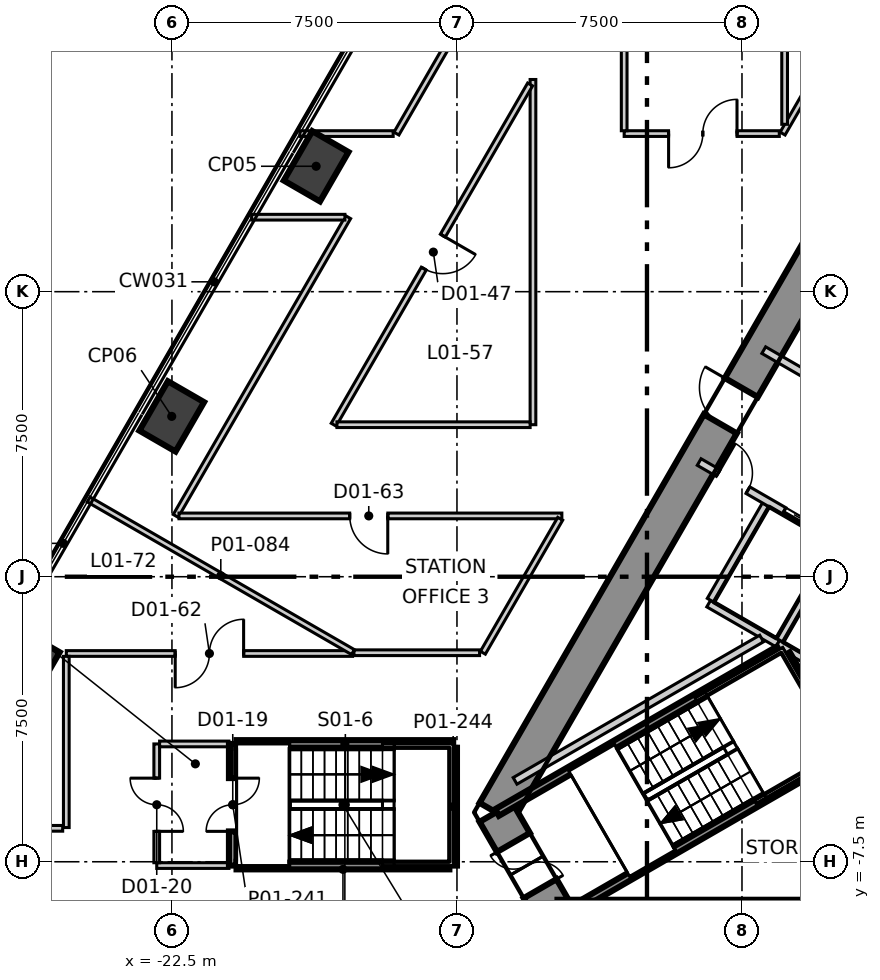
"""IFC4 building model, lengths in metres.
Left out: names, types, materials, properties, quantities, classifications, styles, units other than length and angle.
Written with IfcOpenShell. Run it as: python <this file> out.ifc"""

import sys

from ifc_helpers import new_model, si_unit, direction, frame, frame_2d, origin, origin_2d, place, context, subcontext, project, spatial, polyline, rectangle, outline, extrude, element, fill, save


model = new_model("IFC4")
c1 = context("Model", 3, precision=1e-05, world=origin(), true_north=direction((0.0, 1.0)))
c2 = subcontext(c1, "Body", "Model", "MODEL_VIEW")
j1 = project(units=[si_unit("LENGTHUNIT", "METRE"), si_unit("PLANEANGLEUNIT", "RADIAN")], contexts=[c1])
p1 = place(None, origin())
s1 = spatial("IfcSite", under=j1, at=p1, CompositionType="ELEMENT")
p2 = place(p1, origin())
s2 = spatial("IfcBuilding", under=s1, at=p2, CompositionType="ELEMENT")
p3 = place(p2, frame((0.0, 0.0, 8.5)))
s3 = spatial("IfcBuildingStorey", under=s2, at=p3, CompositionType="ELEMENT", Elevation=8.5)
p4 = place(p3, frame((-1.617, 15.2, -0.4), z_axis=(0.0, 0.0, 1.0), x_axis=(-0.499992141631, -0.866029940768, 0.0)))
e1 = element("IfcWall", 1, at=p4, inside=s3, PredefinedType="SHEAR", context=c2, shape_type="SweptSolid", body=[
    extrude(outline(polyline([(-0.289, -0.499), (1.656, -0.499), (3.601, -0.499), (5.547, -0.499), (7.492, -0.499), (9.437, -0.5), (11.382, -0.5), (13.328, -0.5), (15.273, -0.5), (17.218, -0.5), (19.163, -0.5), (21.109, -0.5), (23.054, -0.5), (24.999, -0.5), (24.422, 0.5), (22.566, 0.5), (20.709, 0.5), (18.853, 0.5), (16.997, 0.5), (15.14, 0.5), (13.284, 0.5), (11.427, 0.5), (9.571, 0.5), (7.715, 0.5), (5.858, 0.5), (4.002, 0.5), (2.146, 0.5), (0.289, 0.5), (-0.289, -0.499)])), origin(), (0.0, 0.0, 1.0), 6.0),
])
p5 = place(p4, frame((11.805, 0.0, 0.4)))
e2 = element("IfcOpeningElement", 2, at=p5, cuts=e1, PredefinedType="OPENING", context=c2, shape_type="SweptSolid", body=[
    extrude(rectangle(XDim=1.1, YDim=2.1, at=frame_2d((0.55, 1.05))), frame((0.0, 0.51, 0.0), z_axis=(0.0, -1.0, 0.0), x_axis=(1.0, 0.0, 0.0)), (0.0, 0.0, 1.0), 1.02),
])
p6 = place(p3, frame((-13.972, -6.2, -0.4), z_axis=(0.0, 0.0, 1.0), x_axis=(0.500077567175, -0.865980615723, 0.0)))
e3 = element("IfcWall", 3, at=p6, inside=s3, PredefinedType="SHEAR", context=c2, shape_type="SweptSolid", body=[
    extrude(outline(polyline([(-0.289, -0.5), (1.616, -0.5), (3.522, -0.5), (2.944, 0.499), (1.617, 0.5), (0.289, 0.5), (-0.289, -0.5)])), origin(), (0.0, 0.0, 1.0), 6.0),
])
p7 = place(p6, frame((0.917, 0.0, 0.4)))
e4 = element("IfcOpeningElement", 4, at=p7, cuts=e3, PredefinedType="OPENING", context=c2, shape_type="SweptSolid", body=[
    extrude(rectangle(XDim=1.4, YDim=2.1, at=frame_2d((0.7, 1.05))), frame((0.0, 0.51, 0.0), z_axis=(0.0, -1.0, 0.0), x_axis=(1.0, 0.0, 0.0)), (0.0, 0.0, 1.0), 1.02),
])
p8 = place(p3, frame((-12.355, -9.0, -0.4), z_axis=(0.0, 0.0, 1.0), x_axis=(1.0, 0.0, 0.0)))
e5 = element("IfcWall", 5, at=p8, inside=s3, PredefinedType="SHEAR", context=c2, shape_type="SweptSolid", body=[
    extrude(outline(polyline([(-0.289, -0.5), (1.656, -0.5), (3.601, -0.5), (5.547, -0.5), (7.492, -0.5), (9.437, -0.5), (11.382, -0.5), (13.328, -0.5), (15.273, -0.5), (17.218, -0.5), (19.163, -0.5), (21.109, -0.5), (23.054, -0.5), (24.999, -0.5), (24.422, 0.5), (22.566, 0.5), (20.709, 0.5), (18.853, 0.5), (16.996, 0.5), (15.14, 0.5), (13.283, 0.5), (11.427, 0.5), (9.57, 0.5), (7.714, 0.5), (5.857, 0.5), (4.001, 0.5), (2.145, 0.5), (0.288, 0.5), (-0.289, -0.5)])), origin(), (0.0, 0.0, 1.0), 6.0),
])
for number, where, z_axis, x_axis in (
    (6, (-18.706, 10.8, -0.4), (0.0, 0.0, 1.0), (0.5, 0.866, 0.0)),
    (7, (-22.506, 4.219, -0.4), (0.0, 0.0, 1.0), (0.5, 0.866, 0.0)),
    (8, (-26.306, -2.362, -0.4), (0.0, 0.0, 1.0), (0.5, 0.866, 0.0)),
):
    element("IfcColumn", number, at=place(p3, frame(where, z_axis=z_axis, x_axis=x_axis)), inside=s3, PredefinedType="COLUMN", context=c2, shape_type="SweptSolid", body=[
        extrude(rectangle(XDim=1.5, YDim=1.1, at=origin_2d()), origin(), (0.0, 0.0, 1.0), 6.0),
    ])
p9 = place(p3, frame((-22.9, -7.6, 0.0), z_axis=(0.0, 0.0, 1.0), x_axis=(1.0, 0.0, 0.0)))
e9 = element("IfcWall", 9, at=p9, inside=s3, PredefinedType="PARTITIONING", context=c2, shape_type="SweptSolid", body=[
    extrude(rectangle(XDim=1.9, YDim=0.15, at=frame_2d((0.95, 0.0))), origin(), (0.0, 0.0, 1.0), 5.6),
])
p10 = place(p3, frame((-22.9, -7.525, 0.0), z_axis=(0.0, 0.0, 1.0), x_axis=(0.0, 1.0, 0.0)))
e10 = element("IfcWall", 10, at=p10, inside=s3, PredefinedType="PARTITIONING", context=c2, shape_type="SweptSolid", body=[
    extrude(rectangle(XDim=3.125, YDim=0.15, at=frame_2d((1.562, 0.0))), origin(), (0.0, 0.0, 1.0), 5.6),
])
p11 = place(p10, frame((0.825, 0.0, 0.0)))
e11 = element("IfcOpeningElement", 11, at=p11, cuts=e10, PredefinedType="OPENING", context=c2, shape_type="SweptSolid", body=[
    extrude(rectangle(XDim=1.4, YDim=2.1, at=frame_2d((0.7, 1.05))), frame((0.0, 0.085, 0.0), z_axis=(0.0, -1.0, 0.0), x_axis=(1.0, 0.0, 0.0)), (0.0, 0.0, 1.0), 0.17),
])
p12 = place(p3, frame((-22.825, -4.4, 0.0), z_axis=(0.0, 0.0, 1.0), x_axis=(1.0, 0.0, 0.0)))
e12 = element("IfcWall", 12, at=p12, inside=s3, PredefinedType="PARTITIONING", context=c2, shape_type="SweptSolid", body=[
    extrude(rectangle(XDim=1.825, YDim=0.15, at=frame_2d((0.913, 0.0))), origin(), (0.0, 0.0, 1.0), 5.6),
])
p13 = place(p3, frame((-25.28, -2.02, 0.0), z_axis=(0.0, 0.0, 1.0), x_axis=(1.0, 0.0, 0.0)))
e13 = element("IfcWall", 13, at=p13, inside=s3, PredefinedType="PARTITIONING", context=c2, shape_type="SweptSolid", body=[
    extrude(rectangle(XDim=7.533, YDim=0.15, at=frame_2d((3.767, 0.0))), origin(), (0.0, 0.0, 1.0), 5.0),
])
p14 = place(p13, frame((2.866, 0.0, 0.0)))
e14 = element("IfcOpeningElement", 14, at=p14, cuts=e13, PredefinedType="OPENING", context=c2, shape_type="SweptSolid", body=[
    extrude(rectangle(XDim=1.8, YDim=2.1, at=frame_2d((0.9, 1.05))), frame((0.0, 0.085, 0.0), z_axis=(0.0, -1.0, 0.0), x_axis=(1.0, 0.0, 0.0)), (0.0, 0.0, 1.0), 0.17),
])
p15 = place(p3, frame((-25.28, -6.6, 0.0), z_axis=(0.0, 0.0, 1.0), x_axis=(0.0, 1.0, 0.0)))
e15 = element("IfcWall", 15, at=p15, inside=s3, PredefinedType="PARTITIONING", context=c2, shape_type="SweptSolid", body=[
    extrude(rectangle(XDim=4.505, YDim=0.15, at=frame_2d((2.252, 0.0))), origin(), (0.0, 0.0, 1.0), 5.6),
])
p16 = place(p3, frame((-27.124, -6.62, 0.0), z_axis=(0.0, 0.0, 1.0), x_axis=(1.0, 0.0, 0.0)))
e16 = element("IfcWall", 16, at=p16, inside=s3, PredefinedType="PARTITIONING", context=c2, shape_type="SweptSolid", body=[
    extrude(rectangle(XDim=1.749, YDim=0.15, at=frame_2d((0.875, 0.0))), origin(), (0.0, 0.0, 1.0), 5.6),
])
p17 = place(p3, frame((-22.401, 1.6, 0.0), z_axis=(0.0, 0.0, 1.0), x_axis=(0.499995671072, 0.866027903078, 0.0)))
e17 = element("IfcWall", 17, at=p17, inside=s3, PredefinedType="PARTITIONING", context=c2, shape_type="SweptSolid", body=[
    extrude(rectangle(XDim=9.076, YDim=0.15, at=frame_2d((4.538, 0.0))), origin(), (0.0, 0.0, 1.0), 5.6),
])
p18 = place(p3, frame((-16.593, 11.66, 0.0), z_axis=(0.0, 0.0, 1.0), x_axis=(0.499996923339, 0.866027180088, 0.0)))
e18 = element("IfcWall", 18, at=p18, inside=s3, PredefinedType="PARTITIONING", context=c2, shape_type="SweptSolid", body=[
    extrude(rectangle(XDim=11.986, YDim=0.15, at=frame_2d((5.993, 0.0))), origin(), (0.0, 0.0, 1.0), 5.6),
])
p19 = place(p3, frame((-24.692, 2.033, 0.0), z_axis=(0.0, 0.0, 1.0), x_axis=(0.865998774365, -0.50004612067, 0.0)))
e19 = element("IfcWall", 19, at=p19, inside=s3, PredefinedType="PARTITIONING", context=c2, shape_type="SweptSolid", body=[
    extrude(rectangle(XDim=8.031, YDim=0.15, at=frame_2d((4.016, 0.0))), origin(), (0.0, 0.0, 1.0), 5.6),
])
p20 = place(p3, frame((-20.403, 9.46, 0.0), z_axis=(0.0, 0.0, 1.0), x_axis=(1.0, 0.0, 0.0)))
e20 = element("IfcWall", 20, at=p20, inside=s3, PredefinedType="PARTITIONING", context=c2, shape_type="SweptSolid", body=[
    extrude(rectangle(XDim=2.454, YDim=0.15, at=frame_2d((1.227, 0.0))), origin(), (0.0, 0.0, 1.0), 5.6),
])
p21 = place(p3, frame((-22.315, 1.6, 0.0), z_axis=(0.0, 0.0, 1.0), x_axis=(1.0, 0.0, 0.0)))
e21 = element("IfcWall", 21, at=p21, inside=s3, PredefinedType="PARTITIONING", context=c2, shape_type="SweptSolid", body=[
    extrude(rectangle(XDim=10.075, YDim=0.15, at=frame_2d((5.038, 0.0))), origin(), (0.0, 0.0, 1.0), 5.6),
])
p22 = place(p21, frame((4.494, 0.0, 0.0)))
e22 = element("IfcOpeningElement", 22, at=p22, cuts=e21, PredefinedType="OPENING", context=c2, shape_type="SweptSolid", body=[
    extrude(rectangle(XDim=1.0, YDim=2.1, at=frame_2d((0.5, 1.05))), frame((0.0, 0.085, 0.0), z_axis=(0.0, -1.0, 0.0), x_axis=(1.0, 0.0, 0.0)), (0.0, 0.0, 1.0), 0.17),
])
p23 = place(p3, frame((-14.318, -2.0, 0.0), z_axis=(0.0, 0.0, 1.0), x_axis=(0.500009753642, 0.866019772443, 0.0)))
e23 = element("IfcWall", 23, at=p23, inside=s3, PredefinedType="PARTITIONING", context=c2, shape_type="SweptSolid", body=[
    extrude(rectangle(XDim=4.07, YDim=0.15, at=frame_2d((2.035, 0.0))), origin(), (0.0, 0.0, 1.0), 5.6),
])
p24 = place(p3, frame((-6.431, 11.66, 0.0), z_axis=(0.0, 0.0, 1.0), x_axis=(0.499933006778, 0.866064078884, 0.0)))
e24 = element("IfcWall", 24, at=p24, inside=s3, PredefinedType="PARTITIONING", context=c2, shape_type="SweptSolid", body=[
    extrude(rectangle(XDim=6.859, YDim=0.15, at=frame_2d((3.429, 0.0))), origin(), (0.0, 0.0, 1.0), 5.6),
])
p25 = place(p3, frame((-17.71, -2.0, 0.0), z_axis=(0.0, 0.0, 1.0), x_axis=(1.0, 0.0, 0.0)))
e25 = element("IfcWall", 25, at=p25, inside=s3, PredefinedType="PARTITIONING", context=c2, shape_type="SweptSolid", body=[
    extrude(rectangle(XDim=3.305, YDim=0.15, at=frame_2d((1.652, 0.0))), origin(), (0.0, 0.0, 1.0), 5.0),
])
p26 = place(p3, frame((-19.133, 11.66, 0.0), z_axis=(0.0, 0.0, 1.0), x_axis=(1.0, 0.0, 0.0)))
e26 = element("IfcWall", 26, at=p26, inside=s3, PredefinedType="PARTITIONING", context=c2, shape_type="SweptSolid", body=[
    extrude(rectangle(XDim=2.454, YDim=0.15, at=frame_2d((1.227, 0.0))), origin(), (0.0, 0.0, 1.0), 5.6),
])
p27 = place(p3, frame((-10.6, 11.66, 0.0), z_axis=(0.0, 0.0, 1.0), x_axis=(1.0, 0.0, 0.0)))
e27 = element("IfcWall", 27, at=p27, inside=s3, PredefinedType="PARTITIONING", context=c2, shape_type="SweptSolid", body=[
    extrude(rectangle(XDim=4.082, YDim=0.15, at=frame_2d((2.041, 0.0))), origin(), (0.0, 0.0, 1.0), 5.6),
])
p28 = place(p27, frame((1.169, 0.0, 0.0)))
e28 = element("IfcOpeningElement", 28, at=p28, cuts=e27, PredefinedType="OPENING", context=c2, shape_type="SweptSolid", body=[
    extrude(rectangle(XDim=1.8, YDim=2.1, at=frame_2d((0.9, 1.05))), frame((0.0, 0.085, 0.0), z_axis=(0.0, -1.0, 0.0), x_axis=(1.0, 0.0, 0.0)), (0.0, 0.0, 1.0), 0.17),
])
p29 = place(p3, frame((-10.6, 11.735, 0.0), z_axis=(0.0, 0.0, 1.0), x_axis=(0.0, 1.0, 0.0)))
e29 = element("IfcWall", 29, at=p29, inside=s3, PredefinedType="PARTITIONING", context=c2, shape_type="SweptSolid", body=[
    extrude(rectangle(XDim=10.155, YDim=0.15, at=frame_2d((5.077, 0.0))), origin(), (0.0, 0.0, 1.0), 5.6),
])
p30 = place(p3, frame((-13.0, 4.0, 0.0), z_axis=(0.0, 0.0, 1.0), x_axis=(0.0, 1.0, 0.0)))
e30 = element("IfcWall", 30, at=p30, inside=s3, PredefinedType="PARTITIONING", context=c2, shape_type="SweptSolid", body=[
    extrude(rectangle(XDim=9.083, YDim=0.15, at=frame_2d((4.542, 0.0))), origin(), (0.0, 0.0, 1.0), 5.6),
])
p31 = place(p3, frame((-6.378, 11.904, 0.0), z_axis=(0.0, 0.0, 1.0), x_axis=(0.0, 1.0, 0.0)))
e31 = element("IfcWall", 31, at=p31, inside=s3, PredefinedType="PARTITIONING", context=c2, shape_type="SweptSolid", body=[
    extrude(rectangle(XDim=21.849, YDim=0.15, at=frame_2d((10.924, 0.0))), origin(), (0.0, 0.0, 1.0), 4.85),
])
p32 = place(p3, frame((-18.244, 4.0, 0.0), z_axis=(0.0, 0.0, 1.0), x_axis=(0.499999792389, 0.866025523649, 0.0)))
e32 = element("IfcWall", 32, at=p32, inside=s3, PredefinedType="PARTITIONING", context=c2, shape_type="SweptSolid", body=[
    extrude(rectangle(XDim=10.338, YDim=0.15, at=frame_2d((5.169, 0.0))), origin(), (0.0, 0.0, 1.0), 5.6),
])
p33 = place(p32, frame((4.744, 0.0, 0.0)))
e33 = element("IfcOpeningElement", 33, at=p33, cuts=e32, PredefinedType="OPENING", context=c2, shape_type="SweptSolid", body=[
    extrude(rectangle(XDim=1.0, YDim=2.1, at=frame_2d((0.5, 1.05))), frame((0.0, 0.085, 0.0), z_axis=(0.0, -1.0, 0.0), x_axis=(1.0, 0.0, 0.0)), (0.0, 0.0, 1.0), 0.17),
])
p34 = place(p3, frame((-18.158, 4.0, 0.0), z_axis=(0.0, 0.0, 1.0), x_axis=(1.0, 0.0, 0.0)))
e34 = element("IfcWall", 34, at=p34, inside=s3, PredefinedType="PARTITIONING", context=c2, shape_type="SweptSolid", body=[
    extrude(rectangle(XDim=5.083, YDim=0.15, at=frame_2d((2.542, 0.0))), origin(), (0.0, 0.0, 1.0), 5.6),
])
p35 = place(p3, frame((-8.376, -0.707, 0.0), z_axis=(0.0, 0.0, 1.0), x_axis=(0.866067520717, -0.499927044236, 0.0)))
e35 = element("IfcWall", 35, at=p35, inside=s3, PredefinedType="SOLIDWALL", context=c2, shape_type="SweptSolid", body=[
    extrude(rectangle(XDim=2.1, YDim=0.2, at=frame_2d((1.05, 0.0))), origin(), (0.0, 0.0, 1.0), 5.6),
])
p36 = place(p3, frame((-8.326, -0.62, 0.0), z_axis=(0.0, 0.0, 1.0), x_axis=(0.500023687443, 0.866011727401, 0.0)))
e36 = element("IfcWall", 36, at=p36, inside=s3, PredefinedType="SOLIDWALL", context=c2, shape_type="SweptSolid", body=[
    extrude(rectangle(XDim=2.9, YDim=0.2, at=frame_2d((1.45, 0.0))), origin(), (0.0, 0.0, 1.0), 5.6),
])
p37 = place(p3, frame((-8.627, 3.018, 0.0), z_axis=(0.0, 0.0, 1.0), x_axis=(0.866039775641, -0.499975106388, 0.0)))
e37 = element("IfcWall", 37, at=p37, inside=s3, PredefinedType="SOLIDWALL", context=c2, shape_type="SweptSolid", body=[
    extrude(rectangle(XDim=4.182, YDim=0.2, at=frame_2d((2.091, 0.0))), origin(), (0.0, 0.0, 1.0), 5.6),
])
p38 = place(p37, frame((2.58, 0.0, 0.0)))
e38 = element("IfcOpeningElement", 38, at=p38, cuts=e37, PredefinedType="OPENING", context=c2, shape_type="SweptSolid", body=[
    extrude(rectangle(XDim=1.1, YDim=2.1, at=frame_2d((0.55, 1.05))), frame((0.0, 0.11, 0.0), z_axis=(0.0, -1.0, 0.0), x_axis=(1.0, 0.0, 0.0)), (0.0, 0.0, 1.0), 0.22),
])
p39 = place(p37, frame((0.58, 0.0, 0.0)))
e39 = element("IfcOpeningElement", 39, at=p39, cuts=e37, PredefinedType="OPENING", context=c2, shape_type="SweptSolid", body=[
    extrude(rectangle(XDim=0.9, YDim=2.1, at=frame_2d((0.45, 1.05))), frame((0.0, 0.11, 0.0), z_axis=(0.0, -1.0, 0.0), x_axis=(1.0, 0.0, 0.0)), (0.0, 0.0, 1.0), 0.22),
])
p40 = place(p3, frame((-6.927, 5.962, 0.0), z_axis=(0.0, 0.0, 1.0), x_axis=(0.866065051207, -0.49993132236, 0.0)))
e40 = element("IfcWall", 40, at=p40, inside=s3, PredefinedType="SOLIDWALL", context=c2, shape_type="SweptSolid", body=[
    extrude(rectangle(XDim=4.182, YDim=0.2, at=frame_2d((2.091, 0.0))), origin(), (0.0, 0.0, 1.0), 5.6),
])
p41 = place(p40, frame((2.68, 0.0, 0.0)))
e41 = element("IfcOpeningElement", 41, at=p41, cuts=e40, PredefinedType="OPENING", context=c2, shape_type="SweptSolid", body=[
    extrude(rectangle(XDim=0.9, YDim=2.1, at=frame_2d((0.45, 1.05))), frame((0.0, 0.11, 0.0), z_axis=(0.0, -1.0, 0.0), x_axis=(1.0, 0.0, 0.0)), (0.0, 0.0, 1.0), 0.22),
])
p42 = place(p3, frame((-6.557, -1.757, 0.0), z_axis=(0.0, 0.0, 1.0), x_axis=(0.8659754619, -0.500086491905, 0.0)))
e42 = element("IfcWall", 42, at=p42, inside=s3, PredefinedType="SOLIDWALL", context=c2, shape_type="SweptSolid", body=[
    extrude(rectangle(XDim=1.916, YDim=0.2, at=frame_2d((0.958, 0.0))), origin(), (0.0, 0.0, 1.0), 5.6),
])
p43 = place(p3, frame((-6.507, -1.67, 0.0), z_axis=(0.0, 0.0, 1.0), x_axis=(0.50012328804, 0.865954211699, 0.0)))
e43 = element("IfcWall", 43, at=p43, inside=s3, PredefinedType="SOLIDWALL", context=c2, shape_type="SweptSolid", body=[
    extrude(rectangle(XDim=2.9, YDim=0.2, at=frame_2d((1.45, 0.0))), origin(), (0.0, 0.0, 1.0), 5.6),
])
p44 = place(p3, frame((-13.471, -5.372, 0.0), z_axis=(0.0, 0.0, 1.0), x_axis=(0.866012469592, 0.50002240201, 0.0)))
e44 = element("IfcWall", 44, at=p44, inside=s3, PredefinedType="SOLIDWALL", context=c2, shape_type="SweptSolid", body=[
    extrude(rectangle(XDim=7.492, YDim=0.2, at=frame_2d((3.746, 0.0))), origin(), (0.0, 0.0, 1.0), 5.6),
])
p45 = place(p3, frame((-13.946, -6.204, 0.0), z_axis=(0.0, 0.0, 1.0), x_axis=(0.866036527536, 0.499980732602, 0.0)))
e45 = element("IfcWall", 45, at=p45, inside=s3, PredefinedType="SOLIDWALL", context=c2, shape_type="SweptSolid", body=[
    extrude(rectangle(XDim=8.564, YDim=0.2, at=frame_2d((4.282, 0.0))), origin(), (0.0, 0.0, 1.0), 5.6),
])
p46 = place(p3, frame((-6.329, -2.038, 0.0), z_axis=(0.0, 0.0, 1.0), x_axis=(0.500200581029, -0.865909567298, 0.0)))
e46 = element("IfcWall", 46, at=p46, inside=s3, PredefinedType="SOLIDWALL", context=c2, shape_type="SweptSolid", body=[
    extrude(rectangle(XDim=2.799, YDim=0.2, at=frame_2d((1.399, 0.0))), origin(), (0.0, 0.0, 1.0), 5.6),
])
p47 = place(p3, frame((-12.346, -8.976, 0.0), z_axis=(0.0, 0.0, 1.0), x_axis=(0.865987152174, 0.50006624788, 0.0)))
e47 = element("IfcWall", 47, at=p47, inside=s3, PredefinedType="SOLIDWALL", context=c2, shape_type="SweptSolid", body=[
    extrude(rectangle(XDim=8.565, YDim=0.2, at=frame_2d((4.282, 0.0))), origin(), (0.0, 0.0, 1.0), 5.6),
])
p48 = place(p3, frame((-20.9, -7.6, 0.0), z_axis=(0.0, 0.0, 1.0), x_axis=(0.0, 1.0, 0.0)))
e48 = element("IfcWall", 48, at=p48, inside=s3, PredefinedType="SOLIDWALL", context=c2, shape_type="SweptSolid", body=[
    extrude(rectangle(XDim=3.2, YDim=0.2, at=frame_2d((1.6, 0.0))), origin(), (0.0, 0.0, 1.0), 5.6),
])
p49 = place(p48, frame((0.9, 0.0, 0.0)))
e49 = element("IfcOpeningElement", 49, at=p49, cuts=e48, PredefinedType="OPENING", context=c2, shape_type="SweptSolid", body=[
    extrude(rectangle(XDim=1.4, YDim=2.1, at=frame_2d((0.7, 1.05))), frame((0.0, 0.11, 0.0), z_axis=(0.0, -1.0, 0.0), x_axis=(1.0, 0.0, 0.0)), (0.0, 0.0, 1.0), 0.22),
])
p50 = place(p3, frame((-20.8, -4.4, 0.0), z_axis=(0.0, 0.0, 1.0), x_axis=(1.0, 0.0, 0.0)))
e50 = element("IfcWall", 50, at=p50, inside=s3, PredefinedType="SOLIDWALL", context=c2, shape_type="SweptSolid", body=[
    extrude(rectangle(XDim=5.7, YDim=0.2, at=frame_2d((2.85, 0.0))), origin(), (0.0, 0.0, 1.0), 5.6),
])
p51 = place(p3, frame((-15.1, -7.6, 0.0), z_axis=(0.0, 0.0, 1.0), x_axis=(0.0, 1.0, 0.0)))
e51 = element("IfcWall", 51, at=p51, inside=s3, PredefinedType="SOLIDWALL", context=c2, shape_type="SweptSolid", body=[
    extrude(rectangle(XDim=3.1, YDim=0.2, at=frame_2d((1.55, 0.0))), origin(), (0.0, 0.0, 1.0), 5.6),
])
p52 = place(p3, frame((-20.8, -7.6, 0.0), z_axis=(0.0, 0.0, 1.0), x_axis=(1.0, 0.0, 0.0)))
e52 = element("IfcWall", 52, at=p52, inside=s3, PredefinedType="SOLIDWALL", context=c2, shape_type="SweptSolid", body=[
    extrude(rectangle(XDim=5.6, YDim=0.2, at=frame_2d((2.8, 0.0))), origin(), (0.0, 0.0, 1.0), 5.6),
])
p53 = place(p38, origin())
e53 = element("IfcDoor", 53, at=p53, inside=s3, OperationType="SLIDING_TO_LEFT", PredefinedType="DOOR", context=c2, shape_type="SweptSolid", body=[
    extrude(rectangle(XDim=1.1, YDim=2.1, at=frame_2d((0.55, 1.05))), frame((0.0, 0.025, 0.0), z_axis=(0.0, -1.0, 0.0), x_axis=(1.0, 0.0, 0.0)), (0.0, 0.0, 1.0), 0.05),
])
fill(e38, e53)
p54 = place(p49, origin())
e54 = element("IfcDoor", 54, at=p54, inside=s3, OperationType="DOUBLE_DOOR_SINGLE_SWING", PredefinedType="DOOR", context=c2, shape_type="SweptSolid", body=[
    extrude(rectangle(XDim=1.4, YDim=2.1, at=frame_2d((0.7, 1.05))), frame((0.0, 0.025, 0.0), z_axis=(0.0, -1.0, 0.0), x_axis=(1.0, 0.0, 0.0)), (0.0, 0.0, 1.0), 0.05),
])
fill(e49, e54)
p55 = place(p11, origin())
e55 = element("IfcDoor", 55, at=p55, inside=s3, OperationType="DOUBLE_DOOR_SINGLE_SWING", PredefinedType="DOOR", context=c2, shape_type="SweptSolid", body=[
    extrude(rectangle(XDim=1.4, YDim=2.1, at=frame_2d((0.7, 1.05))), frame((0.0, 0.025, 0.0), z_axis=(0.0, -1.0, 0.0), x_axis=(1.0, 0.0, 0.0)), (0.0, 0.0, 1.0), 0.05),
])
fill(e11, e55)
p56 = place(p33, origin())
e56 = element("IfcDoor", 56, at=p56, inside=s3, OperationType="SINGLE_SWING_RIGHT", PredefinedType="DOOR", context=c2, shape_type="SweptSolid", body=[
    extrude(rectangle(XDim=1.0, YDim=2.1, at=frame_2d((0.5, 1.05))), frame((0.0, 0.025, 0.0), z_axis=(0.0, -1.0, 0.0), x_axis=(1.0, 0.0, 0.0)), (0.0, 0.0, 1.0), 0.05),
])
fill(e33, e56)
p57 = place(p14, origin())
e57 = element("IfcDoor", 57, at=p57, inside=s3, OperationType="DOUBLE_DOOR_SINGLE_SWING", PredefinedType="DOOR", context=c2, shape_type="SweptSolid", body=[
    extrude(rectangle(XDim=1.8, YDim=2.1, at=frame_2d((0.9, 1.05))), frame((0.0, 0.025, 0.0), z_axis=(0.0, -1.0, 0.0), x_axis=(1.0, 0.0, 0.0)), (0.0, 0.0, 1.0), 0.05),
])
fill(e14, e57)
p58 = place(p22, origin())
e58 = element("IfcDoor", 58, at=p58, inside=s3, OperationType="SINGLE_SWING_RIGHT", PredefinedType="DOOR", context=c2, shape_type="SweptSolid", body=[
    extrude(rectangle(XDim=1.0, YDim=2.1, at=frame_2d((0.5, 1.05))), frame((0.0, 0.025, 0.0), z_axis=(0.0, -1.0, 0.0), x_axis=(1.0, 0.0, 0.0)), (0.0, 0.0, 1.0), 0.05),
])
fill(e22, e58)
p59 = place(p28, origin())
e59 = element("IfcDoor", 59, at=p59, inside=s3, OperationType="DOUBLE_DOOR_SINGLE_SWING", PredefinedType="DOOR", context=c2, shape_type="SweptSolid", body=[
    extrude(rectangle(XDim=1.8, YDim=2.1, at=frame_2d((0.9, 1.05))), frame((0.0, 0.025, 0.0), z_axis=(0.0, -1.0, 0.0), x_axis=(1.0, 0.0, 0.0)), (0.0, 0.0, 1.0), 0.05),
])
fill(e28, e59)
p60 = place(p7, origin())
e60 = element("IfcDoor", 60, at=p60, inside=s3, OperationType="DOUBLE_DOOR_SINGLE_SWING", PredefinedType="DOOR", context=c2, shape_type="SweptSolid", body=[
    extrude(rectangle(XDim=1.4, YDim=2.1, at=frame_2d((0.7, 1.05))), frame((0.0, 0.025, 0.0), z_axis=(0.0, -1.0, 0.0), x_axis=(1.0, 0.0, 0.0)), (0.0, 0.0, 1.0), 0.05),
])
fill(e4, e60)
p61 = place(p5, origin())
e61 = element("IfcDoor", 61, at=p61, inside=s3, OperationType="SINGLE_SWING_LEFT", PredefinedType="DOOR", context=c2, shape_type="SweptSolid", body=[
    extrude(rectangle(XDim=1.1, YDim=2.1, at=frame_2d((0.55, 1.05))), frame((0.0, 0.025, 0.0), z_axis=(0.0, -1.0, 0.0), x_axis=(1.0, 0.0, 0.0)), (0.0, 0.0, 1.0), 0.05),
])
fill(e2, e61)
p62 = place(p39, origin())
e62 = element("IfcDoor", 62, at=p62, inside=s3, OperationType="SINGLE_SWING_RIGHT", PredefinedType="DOOR", context=c2, shape_type="SweptSolid", body=[
    extrude(rectangle(XDim=0.9, YDim=2.1, at=frame_2d((0.45, 1.05))), frame((0.0, 0.025, 0.0), z_axis=(0.0, -1.0, 0.0), x_axis=(1.0, 0.0, 0.0)), (0.0, 0.0, 1.0), 0.05),
])
fill(e39, e62)
save(model, sys.argv[1])
